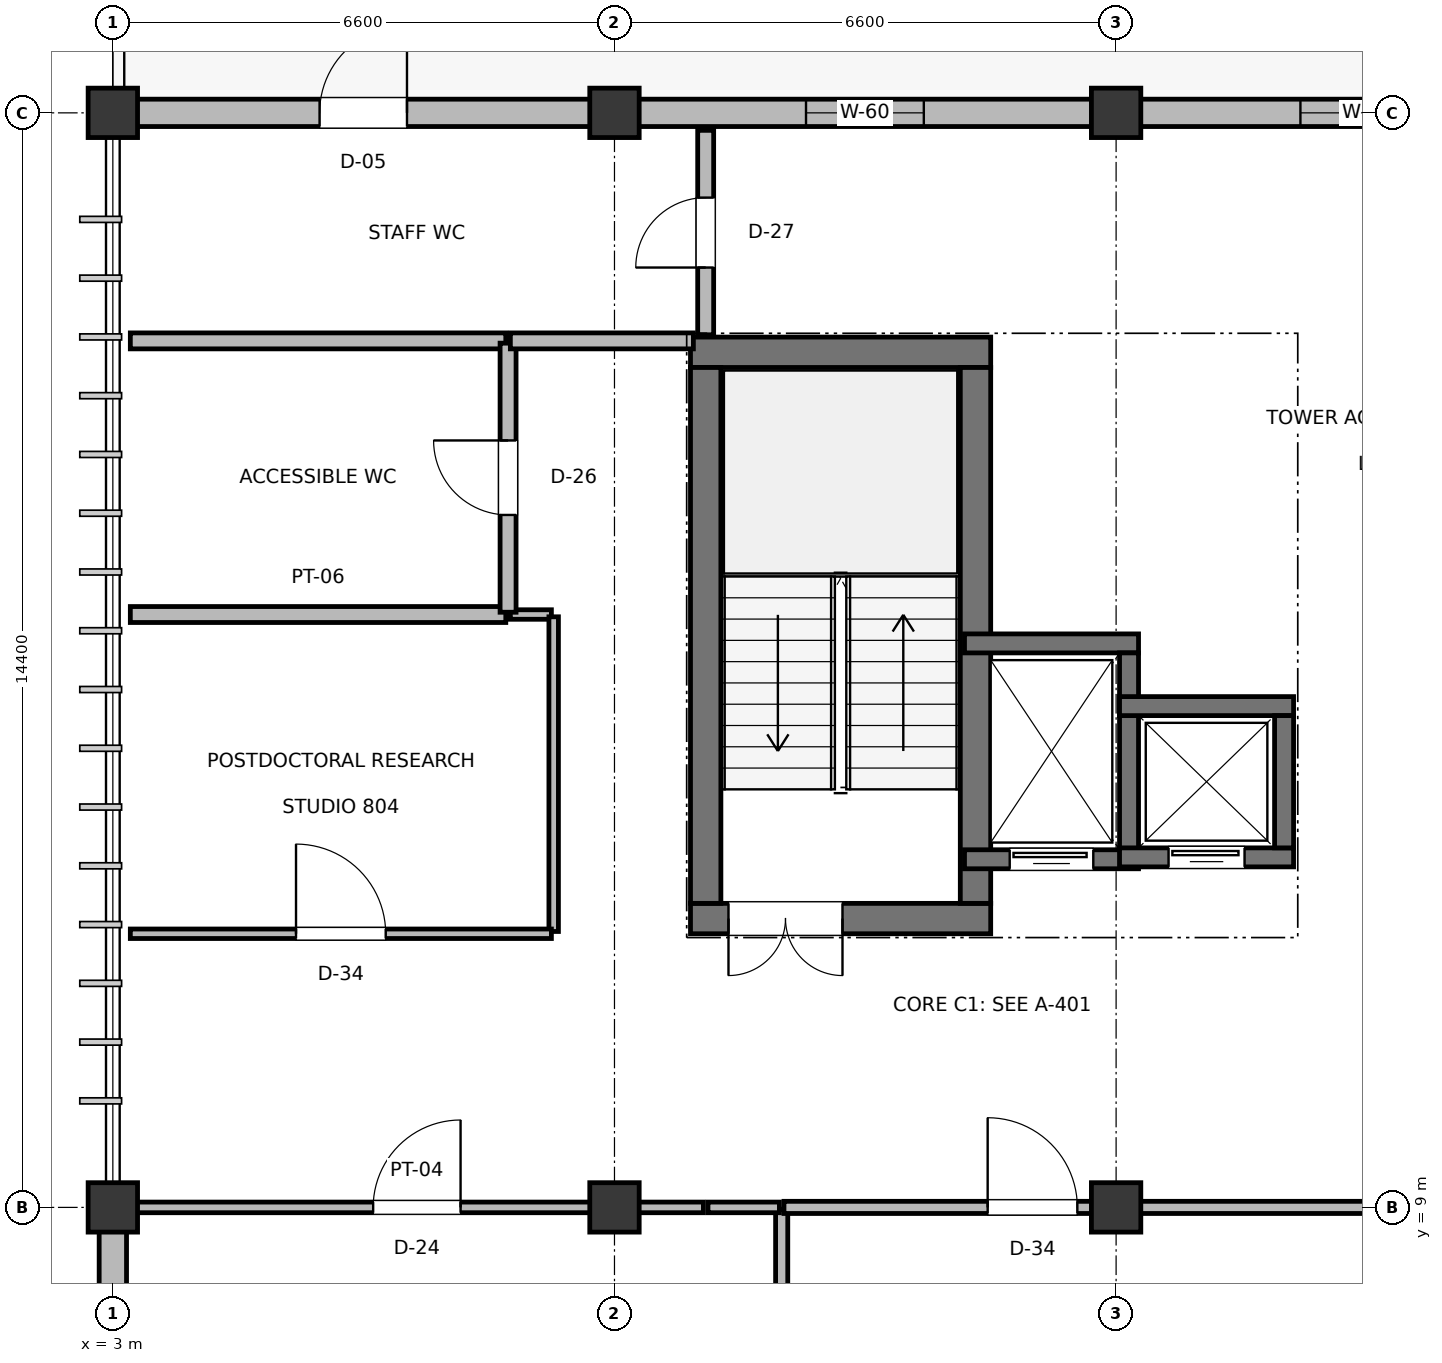
"""IFC4 building model, lengths in metres.
Left out: names, types, materials, properties, quantities, classifications, styles, units other than length and angle.
Written with IfcOpenShell. Run it as: python <this file> out.ifc"""

import sys

from ifc_helpers import new_model, si_unit, direction, frame, frame_2d, origin, origin_2d, place, context, subcontext, project, spatial, rectangle, extrude, element, fill, save


model = new_model("IFC4")
c1 = context("Model", 3, precision=1e-05, world=origin(), true_north=direction((0.0, 1.0)))
c2 = subcontext(c1, "Body", "Model", "MODEL_VIEW")
j1 = project(units=[si_unit("LENGTHUNIT", "METRE"), si_unit("PLANEANGLEUNIT", "RADIAN")], contexts=[c1])
p1 = place(None, origin())
s1 = spatial("IfcSite", under=j1, at=p1, CompositionType="ELEMENT")
p2 = place(p1, origin())
s2 = spatial("IfcBuilding", under=s1, at=p2, CompositionType="ELEMENT")
p3 = place(p2, frame((0.0, 0.0, 36.8)))
s3 = spatial("IfcBuildingStorey", under=s2, at=p3, CompositionType="ELEMENT", Elevation=36.8)
for number, where, z_axis, x_axis in (
    (1, (3.0, 9.0, 0.0), (0.0, 0.0, 1.0), (1.0, 0.0, 0.0)),
    (2, (3.0, 23.4, 0.0), (0.0, 0.0, 1.0), (1.0, 0.0, 0.0)),
    (3, (9.6, 9.0, 0.0), (0.0, 0.0, 1.0), (1.0, 0.0, 0.0)),
    (4, (9.6, 23.4, 0.0), (0.0, 0.0, 1.0), (1.0, 0.0, 0.0)),
    (5, (16.2, 9.0, 0.0), (0.0, 0.0, 1.0), (1.0, 0.0, 0.0)),
    (6, (16.2, 23.4, 0.0), (0.0, 0.0, 1.0), (1.0, 0.0, 0.0)),
):
    element("IfcColumn", number, at=place(p3, frame(where, z_axis=z_axis, x_axis=x_axis)), inside=s3, PredefinedType="COLUMN", context=c2, shape_type="SweptSolid", body=[
        extrude(rectangle(XDim=0.65, YDim=0.65, at=origin_2d()), origin(), (0.0, 0.0, 1.0), 3.8),
    ])
p4 = place(p3, frame((3.0, 3.305, 0.0), z_axis=(0.0, 0.0, 1.0), x_axis=(0.0, 1.0, 0.0)))
e7 = element("IfcWall", 7, at=p4, inside=s3, PredefinedType="SOLIDWALL", context=c2, shape_type="SweptSolid", body=[
    extrude(rectangle(XDim=5.38, YDim=0.36, at=frame_2d((2.69, 0.0))), origin(), (0.0, 0.0, 1.0), 2.875),
])
p5 = place(p4, frame((1.915, 0.0, 0.9)))
e8 = element("IfcOpeningElement", 8, at=p5, cuts=e7, PredefinedType="OPENING", context=c2, shape_type="SweptSolid", body=[
    extrude(rectangle(XDim=1.55, YDim=1.15, at=frame_2d((0.775, 0.575))), frame((0.0, 0.19, 0.0), z_axis=(0.0, -1.0, 0.0), x_axis=(1.0, 0.0, 0.0)), (0.0, 0.0, 1.0), 0.38),
])
p6 = place(p3, frame((3.305, 23.4, 0.0), z_axis=(0.0, 0.0, 1.0), x_axis=(1.0, 0.0, 0.0)))
e9 = element("IfcWall", 9, at=p6, inside=s3, PredefinedType="SOLIDWALL", context=c2, shape_type="SweptSolid", body=[
    extrude(rectangle(XDim=5.98, YDim=0.36, at=frame_2d((2.99, 0.0))), origin(), (0.0, 0.0, 1.0), 2.595),
])
p7 = place(p6, frame((2.415, 0.0, 0.0)))
e10 = element("IfcOpeningElement", 10, at=p7, cuts=e9, PredefinedType="OPENING", context=c2, shape_type="SweptSolid", body=[
    extrude(rectangle(XDim=1.15, YDim=2.2, at=frame_2d((0.575, 1.1))), frame((0.0, 0.19, 0.0), z_axis=(0.0, -1.0, 0.0), x_axis=(1.0, 0.0, 0.0)), (0.0, 0.0, 1.0), 0.38),
])
p8 = place(p3, frame((9.905, 23.4, 0.0), z_axis=(0.0, 0.0, 1.0), x_axis=(1.0, 0.0, 0.0)))
e11 = element("IfcWall", 11, at=p8, inside=s3, PredefinedType="SOLIDWALL", context=c2, shape_type="SweptSolid", body=[
    extrude(rectangle(XDim=5.98, YDim=0.36, at=frame_2d((2.99, 0.0))), origin(), (0.0, 0.0, 1.0), 2.825),
])
p9 = place(p8, frame((2.215, 0.0, 0.9)))
e12 = element("IfcOpeningElement", 12, at=p9, cuts=e11, PredefinedType="OPENING", context=c2, shape_type="SweptSolid", body=[
    extrude(rectangle(XDim=1.55, YDim=1.75, at=frame_2d((0.775, 0.875))), frame((0.0, 0.19, 0.0), z_axis=(0.0, -1.0, 0.0), x_axis=(1.0, 0.0, 0.0)), (0.0, 0.0, 1.0), 0.38),
])
p10 = place(p3, frame((16.505, 23.4, 0.0), z_axis=(0.0, 0.0, 1.0), x_axis=(1.0, 0.0, 0.0)))
e13 = element("IfcWall", 13, at=p10, inside=s3, PredefinedType="SOLIDWALL", context=c2, shape_type="SweptSolid", body=[
    extrude(rectangle(XDim=5.99, YDim=0.36, at=frame_2d((2.995, 0.0))), origin(), (0.0, 0.0, 1.0), 2.615),
])
p11 = place(p10, frame((2.12, 0.0, 0.9)))
e14 = element("IfcOpeningElement", 14, at=p11, cuts=e13, PredefinedType="OPENING", context=c2, shape_type="SweptSolid", body=[
    extrude(rectangle(XDim=1.75, YDim=1.15, at=frame_2d((0.875, 0.575))), frame((0.0, 0.19, 0.0), z_axis=(0.0, -1.0, 0.0), x_axis=(1.0, 0.0, 0.0)), (0.0, 0.0, 1.0), 0.38),
])
p12 = place(p3, frame((10.6, 12.8, 0.0), z_axis=(0.0, 0.0, 1.0), x_axis=(1.0, 0.0, 0.0)))
e15 = element("IfcWall", 15, at=p12, inside=s3, PredefinedType="SHEAR", context=c2, shape_type="SweptSolid", body=[
    extrude(rectangle(XDim=3.95, YDim=0.4, at=frame_2d((1.975, 0.0))), origin(), (0.0, 0.0, 1.0), 3.58),
])
p13 = place(p12, frame((0.5, 0.0, 0.0)))
e16 = element("IfcOpeningElement", 16, at=p13, cuts=e15, PredefinedType="OPENING", context=c2, shape_type="SweptSolid", body=[
    extrude(rectangle(XDim=1.5, YDim=2.2, at=frame_2d((0.75, 1.1))), frame((0.0, 0.21, 0.0), z_axis=(0.0, -1.0, 0.0), x_axis=(1.0, 0.0, 0.0)), (0.0, 0.0, 1.0), 0.42),
])
p14 = place(p3, frame((10.6, 20.25, 0.0), z_axis=(0.0, 0.0, 1.0), x_axis=(1.0, 0.0, 0.0)))
e17 = element("IfcWall", 17, at=p14, inside=s3, PredefinedType="SHEAR", context=c2, shape_type="SweptSolid", body=[
    extrude(rectangle(XDim=3.95, YDim=0.4, at=frame_2d((1.975, 0.0))), origin(), (0.0, 0.0, 1.0), 3.58),
])
for number, where, z_axis, x_axis in (
    (18, (10.8, 13.0, 0.0), (0.0, 0.0, 1.0), (0.0, 1.0, 0.0)),
    (19, (14.35, 13.0, 0.0), (0.0, 0.0, 1.0), (0.0, 1.0, 0.0)),
):
    element("IfcWall", number, at=place(p3, frame(where, z_axis=z_axis, x_axis=x_axis)), inside=s3, PredefinedType="SHEAR", context=c2, shape_type="SweptSolid", body=[
        extrude(rectangle(XDim=7.05, YDim=0.4, at=frame_2d((3.525, 0.0))), origin(), (0.0, 0.0, 1.0), 3.58),
    ])
p15 = place(p3, frame((14.205, 13.58, 0.0), z_axis=(0.0, 0.0, 1.0), x_axis=(1.0, 0.0, 0.0)))
e20 = element("IfcWall", 20, at=p15, inside=s3, PredefinedType="SHEAR", context=c2, shape_type="SweptSolid", body=[
    extrude(rectangle(XDim=2.29, YDim=0.25, at=frame_2d((1.145, 0.0))), origin(), (0.0, 0.0, 1.0), 3.56),
])
p16 = place(p15, frame((0.595, 0.0, 0.0)))
e21 = element("IfcOpeningElement", 21, at=p16, cuts=e20, PredefinedType="OPENING", context=c2, shape_type="SweptSolid", body=[
    extrude(rectangle(XDim=1.1, YDim=2.2, at=frame_2d((0.55, 1.1))), frame((0.0, 0.135, 0.0), z_axis=(0.0, -1.0, 0.0), x_axis=(1.0, 0.0, 0.0)), (0.0, 0.0, 1.0), 0.27),
])
p17 = place(p3, frame((14.205, 16.42, 0.0), z_axis=(0.0, 0.0, 1.0), x_axis=(1.0, 0.0, 0.0)))
e22 = element("IfcWall", 22, at=p17, inside=s3, PredefinedType="SHEAR", context=c2, shape_type="SweptSolid", body=[
    extrude(rectangle(XDim=2.29, YDim=0.25, at=frame_2d((1.145, 0.0))), origin(), (0.0, 0.0, 1.0), 3.56),
])
p18 = place(p3, frame((16.37, 13.705, 0.0), z_axis=(0.0, 0.0, 1.0), x_axis=(0.0, 1.0, 0.0)))
e23 = element("IfcWall", 23, at=p18, inside=s3, PredefinedType="SHEAR", context=c2, shape_type="SweptSolid", body=[
    extrude(rectangle(XDim=2.59, YDim=0.25, at=frame_2d((1.295, 0.0))), origin(), (0.0, 0.0, 1.0), 3.56),
])
p19 = place(p3, frame((16.245, 13.605, 0.0), z_axis=(0.0, 0.0, 1.0), x_axis=(1.0, 0.0, 0.0)))
e24 = element("IfcWall", 24, at=p19, inside=s3, PredefinedType="SHEAR", context=c2, shape_type="SweptSolid", body=[
    extrude(rectangle(XDim=2.29, YDim=0.25, at=frame_2d((1.145, 0.0))), origin(), (0.0, 0.0, 1.0), 3.56),
])
p20 = place(p19, frame((0.645, 0.0, 0.0)))
e25 = element("IfcOpeningElement", 25, at=p20, cuts=e24, PredefinedType="OPENING", context=c2, shape_type="SweptSolid", body=[
    extrude(rectangle(XDim=1.0, YDim=2.15, at=frame_2d((0.5, 1.075))), frame((0.0, 0.135, 0.0), z_axis=(0.0, -1.0, 0.0), x_axis=(1.0, 0.0, 0.0)), (0.0, 0.0, 1.0), 0.27),
])
p21 = place(p3, frame((16.245, 15.595, 0.0), z_axis=(0.0, 0.0, 1.0), x_axis=(1.0, 0.0, 0.0)))
e26 = element("IfcWall", 26, at=p21, inside=s3, PredefinedType="SHEAR", context=c2, shape_type="SweptSolid", body=[
    extrude(rectangle(XDim=2.29, YDim=0.25, at=frame_2d((1.145, 0.0))), origin(), (0.0, 0.0, 1.0), 3.56),
])
p22 = place(p3, frame((18.41, 13.73, 0.0), z_axis=(0.0, 0.0, 1.0), x_axis=(0.0, 1.0, 0.0)))
e27 = element("IfcWall", 27, at=p22, inside=s3, PredefinedType="SHEAR", context=c2, shape_type="SweptSolid", body=[
    extrude(rectangle(XDim=1.74, YDim=0.25, at=frame_2d((0.87, 0.0))), origin(), (0.0, 0.0, 1.0), 3.56),
])
p23 = place(p3, frame((11.8, 3.23, 0.0), z_axis=(0.0, 0.0, 1.0), x_axis=(0.0, 1.0, 0.0)))
e28 = element("IfcWall", 28, at=p23, inside=s3, PredefinedType="PARTITIONING", context=c2, shape_type="SweptSolid", body=[
    extrude(rectangle(XDim=5.74, YDim=0.16, at=frame_2d((2.87, 0.0))), origin(), (0.0, 0.0, 1.0), 2.825),
])
p24 = place(p3, frame((3.23, 9.0, 0.0), z_axis=(0.0, 0.0, 1.0), x_axis=(1.0, 0.0, 0.0)))
e29 = element("IfcWall", 29, at=p24, inside=s3, PredefinedType="PARTITIONING", context=c2, shape_type="SweptSolid", body=[
    extrude(rectangle(XDim=7.54, YDim=0.14, at=frame_2d((3.77, 0.0))), origin(), (0.0, 0.0, 1.0), 2.655),
])
p25 = place(p24, frame((3.195, 0.0, 0.0)))
e30 = element("IfcOpeningElement", 30, at=p25, cuts=e29, PredefinedType="OPENING", context=c2, shape_type="SweptSolid", body=[
    extrude(rectangle(XDim=1.15, YDim=2.15, at=frame_2d((0.575, 1.075))), frame((0.0, 0.08, 0.0), z_axis=(0.0, -1.0, 0.0), x_axis=(1.0, 0.0, 0.0)), (0.0, 0.0, 1.0), 0.16),
])
p26 = place(p3, frame((10.83, 9.0, 0.0), z_axis=(0.0, 0.0, 1.0), x_axis=(1.0, 0.0, 0.0)))
e31 = element("IfcWall", 31, at=p26, inside=s3, PredefinedType="PARTITIONING", context=c2, shape_type="SweptSolid", body=[
    extrude(rectangle(XDim=0.94, YDim=0.14, at=frame_2d((0.47, 0.0))), origin(), (0.0, 0.0, 1.0), 2.825),
])
p27 = place(p3, frame((11.83, 9.0, 0.0), z_axis=(0.0, 0.0, 1.0), x_axis=(1.0, 0.0, 0.0)))
e32 = element("IfcWall", 32, at=p27, inside=s3, PredefinedType="PARTITIONING", context=c2, shape_type="SweptSolid", body=[
    extrude(rectangle(XDim=8.34, YDim=0.16, at=frame_2d((4.17, 0.0))), origin(), (0.0, 0.0, 1.0), 2.615),
])
p28 = place(p27, frame((2.68, 0.0, 0.0)))
e33 = element("IfcOpeningElement", 33, at=p28, cuts=e32, PredefinedType="OPENING", context=c2, shape_type="SweptSolid", body=[
    extrude(rectangle(XDim=1.18, YDim=2.2, at=frame_2d((0.59, 1.1))), frame((0.0, 0.09, 0.0), z_axis=(0.0, -1.0, 0.0), x_axis=(1.0, 0.0, 0.0)), (0.0, 0.0, 1.0), 0.18),
])
p29 = place(p3, frame((3.23, 16.8, 0.0), z_axis=(0.0, 0.0, 1.0), x_axis=(1.0, 0.0, 0.0)))
e34 = element("IfcWall", 34, at=p29, inside=s3, PredefinedType="PLUMBINGWALL", context=c2, shape_type="SweptSolid", body=[
    extrude(rectangle(XDim=4.94, YDim=0.21, at=frame_2d((2.47, 0.0))), origin(), (0.0, 0.0, 1.0), 2.875),
])
p30 = place(p3, frame((8.23, 16.8, 0.0), z_axis=(0.0, 0.0, 1.0), x_axis=(1.0, 0.0, 0.0)))
e35 = element("IfcWall", 35, at=p30, inside=s3, PredefinedType="PARTITIONING", context=c2, shape_type="SweptSolid", body=[
    extrude(rectangle(XDim=0.54, YDim=0.125, at=frame_2d((0.27, 0.0))), origin(), (0.0, 0.0, 1.0), 3.48),
])
p31 = place(p3, frame((8.8, 12.63, 0.0), z_axis=(0.0, 0.0, 1.0), x_axis=(0.0, 1.0, 0.0)))
e36 = element("IfcWall", 36, at=p31, inside=s3, PredefinedType="PARTITIONING", context=c2, shape_type="SweptSolid", body=[
    extrude(rectangle(XDim=4.14, YDim=0.125, at=frame_2d((2.07, 0.0))), origin(), (0.0, 0.0, 1.0), 3.48),
])
p32 = place(p3, frame((3.23, 12.6, 0.0), z_axis=(0.0, 0.0, 1.0), x_axis=(1.0, 0.0, 0.0)))
e37 = element("IfcWall", 37, at=p32, inside=s3, PredefinedType="PARTITIONING", context=c2, shape_type="SweptSolid", body=[
    extrude(rectangle(XDim=5.54, YDim=0.125, at=frame_2d((2.77, 0.0))), origin(), (0.0, 0.0, 1.0), 2.875),
])
p33 = place(p32, frame((2.18, 0.0, 0.0)))
e38 = element("IfcOpeningElement", 38, at=p33, cuts=e37, PredefinedType="OPENING", context=c2, shape_type="SweptSolid", body=[
    extrude(rectangle(XDim=1.18, YDim=2.2, at=frame_2d((0.59, 1.1))), frame((0.0, 0.073, 0.0), z_axis=(0.0, -1.0, 0.0), x_axis=(1.0, 0.0, 0.0)), (0.0, 0.0, 1.0), 0.145),
])
p34 = place(p3, frame((3.23, 20.4, 0.0), z_axis=(0.0, 0.0, 1.0), x_axis=(1.0, 0.0, 0.0)))
e39 = element("IfcWall", 39, at=p34, inside=s3, PredefinedType="PLUMBINGWALL", context=c2, shape_type="SweptSolid", body=[
    extrude(rectangle(XDim=4.94, YDim=0.21, at=frame_2d((2.47, 0.0))), origin(), (0.0, 0.0, 1.0), 2.875),
])
p35 = place(p3, frame((8.2, 16.83, 0.0), z_axis=(0.0, 0.0, 1.0), x_axis=(0.0, 1.0, 0.0)))
e40 = element("IfcWall", 40, at=p35, inside=s3, PredefinedType="PLUMBINGWALL", context=c2, shape_type="SweptSolid", body=[
    extrude(rectangle(XDim=3.54, YDim=0.21, at=frame_2d((1.77, 0.0))), origin(), (0.0, 0.0, 1.0), 3.48),
])
p36 = place(p35, frame((1.28, 0.0, 0.0)))
e41 = element("IfcOpeningElement", 41, at=p36, cuts=e40, PredefinedType="OPENING", context=c2, shape_type="SweptSolid", body=[
    extrude(rectangle(XDim=0.98, YDim=2.1, at=frame_2d((0.49, 1.05))), frame((0.0, 0.115, 0.0), z_axis=(0.0, -1.0, 0.0), x_axis=(1.0, 0.0, 0.0)), (0.0, 0.0, 1.0), 0.23),
])
p37 = place(p3, frame((8.23, 20.4, 0.0), z_axis=(0.0, 0.0, 1.0), x_axis=(1.0, 0.0, 0.0)))
e42 = element("IfcWall", 42, at=p37, inside=s3, PredefinedType="PLUMBINGWALL", context=c2, shape_type="SweptSolid", body=[
    extrude(rectangle(XDim=2.408, YDim=0.21, at=frame_2d((1.204, 0.0))), origin(), (0.0, 0.0, 1.0), 2.725),
])
p38 = place(p3, frame((10.8, 20.48, 0.0), z_axis=(0.0, 0.0, 1.0), x_axis=(0.0, 1.0, 0.0)))
e43 = element("IfcWall", 43, at=p38, inside=s3, PredefinedType="PLUMBINGWALL", context=c2, shape_type="SweptSolid", body=[
    extrude(rectangle(XDim=2.69, YDim=0.21, at=frame_2d((1.345, 0.0))), origin(), (0.0, 0.0, 1.0), 2.825),
])
p39 = place(p38, frame((0.885, 0.0, 0.0)))
e44 = element("IfcOpeningElement", 44, at=p39, cuts=e43, PredefinedType="OPENING", context=c2, shape_type="SweptSolid", body=[
    extrude(rectangle(XDim=0.92, YDim=2.1, at=frame_2d((0.46, 1.05))), frame((0.0, 0.115, 0.0), z_axis=(0.0, -1.0, 0.0), x_axis=(1.0, 0.0, 0.0)), (0.0, 0.0, 1.0), 0.23),
])
p40 = place(p7, origin())
e45 = element("IfcDoor", 45, at=p40, inside=s3, OperationType="SINGLE_SWING_RIGHT", PredefinedType="DOOR", context=c2, shape_type="SweptSolid", body=[
    extrude(rectangle(XDim=1.15, YDim=2.2, at=frame_2d((0.575, 1.1))), frame((0.0, 0.025, 0.0), z_axis=(0.0, -1.0, 0.0), x_axis=(1.0, 0.0, 0.0)), (0.0, 0.0, 1.0), 0.05),
])
fill(e10, e45)
p41 = place(p9, origin())
e46 = element("IfcWindow", 46, at=p41, inside=s3, PartitioningType="DOUBLE_PANEL_VERTICAL", PredefinedType="WINDOW", context=c2, shape_type="SweptSolid", body=[
    extrude(rectangle(XDim=1.55, YDim=1.75, at=frame_2d((0.775, 0.875))), frame((0.0, 0.03, 0.0), z_axis=(0.0, -1.0, 0.0), x_axis=(1.0, 0.0, 0.0)), (0.0, 0.0, 1.0), 0.06),
])
fill(e12, e46)
p42 = place(p11, origin())
e47 = element("IfcWindow", 47, at=p42, inside=s3, PartitioningType="DOUBLE_PANEL_VERTICAL", PredefinedType="WINDOW", context=c2, shape_type="SweptSolid", body=[
    extrude(rectangle(XDim=1.75, YDim=1.15, at=frame_2d((0.875, 0.575))), frame((0.0, 0.03, 0.0), z_axis=(0.0, -1.0, 0.0), x_axis=(1.0, 0.0, 0.0)), (0.0, 0.0, 1.0), 0.06),
])
fill(e14, e47)
p43 = place(p13, frame((1.5, 0.0, 0.0), z_axis=(0.0, 0.0, 1.0), x_axis=(-1.0, 0.0, 0.0)))
e48 = element("IfcDoor", 48, at=p43, inside=s3, OperationType="DOUBLE_DOOR_SINGLE_SWING", PredefinedType="DOOR", context=c2, shape_type="SweptSolid", body=[
    extrude(rectangle(XDim=1.5, YDim=2.2, at=frame_2d((0.75, 1.1))), frame((0.0, 0.025, 0.0), z_axis=(0.0, -1.0, 0.0), x_axis=(1.0, 0.0, 0.0)), (0.0, 0.0, 1.0), 0.05),
])
fill(e16, e48)
p44 = place(p16, frame((1.1, 0.0, 0.0), z_axis=(0.0, 0.0, 1.0), x_axis=(-1.0, 0.0, 0.0)))
e49 = element("IfcDoor", 49, at=p44, inside=s3, OperationType="SLIDING_TO_LEFT", PredefinedType="DOOR", context=c2, shape_type="SweptSolid", body=[
    extrude(rectangle(XDim=1.1, YDim=2.2, at=frame_2d((0.55, 1.1))), frame((0.0, 0.025, 0.0), z_axis=(0.0, -1.0, 0.0), x_axis=(1.0, 0.0, 0.0)), (0.0, 0.0, 1.0), 0.05),
])
fill(e21, e49)
p45 = place(p20, frame((1.0, 0.0, 0.0), z_axis=(0.0, 0.0, 1.0), x_axis=(-1.0, 0.0, 0.0)))
e50 = element("IfcDoor", 50, at=p45, inside=s3, OperationType="SLIDING_TO_LEFT", PredefinedType="DOOR", context=c2, shape_type="SweptSolid", body=[
    extrude(rectangle(XDim=1.0, YDim=2.15, at=frame_2d((0.5, 1.075))), frame((0.0, 0.025, 0.0), z_axis=(0.0, -1.0, 0.0), x_axis=(1.0, 0.0, 0.0)), (0.0, 0.0, 1.0), 0.05),
])
fill(e25, e50)
p46 = place(p25, origin())
e51 = element("IfcDoor", 51, at=p46, inside=s3, OperationType="SINGLE_SWING_RIGHT", PredefinedType="DOOR", context=c2, shape_type="SweptSolid", body=[
    extrude(rectangle(XDim=1.15, YDim=2.15, at=frame_2d((0.575, 1.075))), frame((0.0, 0.025, 0.0), z_axis=(0.0, -1.0, 0.0), x_axis=(1.0, 0.0, 0.0)), (0.0, 0.0, 1.0), 0.05),
])
fill(e30, e51)
p47 = place(p28, origin())
e52 = element("IfcDoor", 52, at=p47, inside=s3, OperationType="SINGLE_SWING_LEFT", PredefinedType="DOOR", context=c2, shape_type="SweptSolid", body=[
    extrude(rectangle(XDim=1.18, YDim=2.2, at=frame_2d((0.59, 1.1))), frame((0.0, 0.025, 0.0), z_axis=(0.0, -1.0, 0.0), x_axis=(1.0, 0.0, 0.0)), (0.0, 0.0, 1.0), 0.05),
])
fill(e33, e52)
p48 = place(p33, origin())
e53 = element("IfcDoor", 53, at=p48, inside=s3, OperationType="SINGLE_SWING_LEFT", PredefinedType="DOOR", context=c2, shape_type="SweptSolid", body=[
    extrude(rectangle(XDim=1.18, YDim=2.2, at=frame_2d((0.59, 1.1))), frame((0.0, 0.025, 0.0), z_axis=(0.0, -1.0, 0.0), x_axis=(1.0, 0.0, 0.0)), (0.0, 0.0, 1.0), 0.05),
])
fill(e38, e53)
p49 = place(p36, origin())
e54 = element("IfcDoor", 54, at=p49, inside=s3, OperationType="SINGLE_SWING_RIGHT", PredefinedType="DOOR", context=c2, shape_type="SweptSolid", body=[
    extrude(rectangle(XDim=0.98, YDim=2.1, at=frame_2d((0.49, 1.05))), frame((0.0, 0.025, 0.0), z_axis=(0.0, -1.0, 0.0), x_axis=(1.0, 0.0, 0.0)), (0.0, 0.0, 1.0), 0.05),
])
fill(e41, e54)
p50 = place(p39, origin())
e55 = element("IfcDoor", 55, at=p50, inside=s3, OperationType="SINGLE_SWING_LEFT", PredefinedType="DOOR", context=c2, shape_type="SweptSolid", body=[
    extrude(rectangle(XDim=0.92, YDim=2.1, at=frame_2d((0.46, 1.05))), frame((0.0, 0.025, 0.0), z_axis=(0.0, -1.0, 0.0), x_axis=(1.0, 0.0, 0.0)), (0.0, 0.0, 1.0), 0.05),
])
fill(e44, e55)
save(model, sys.argv[1])
